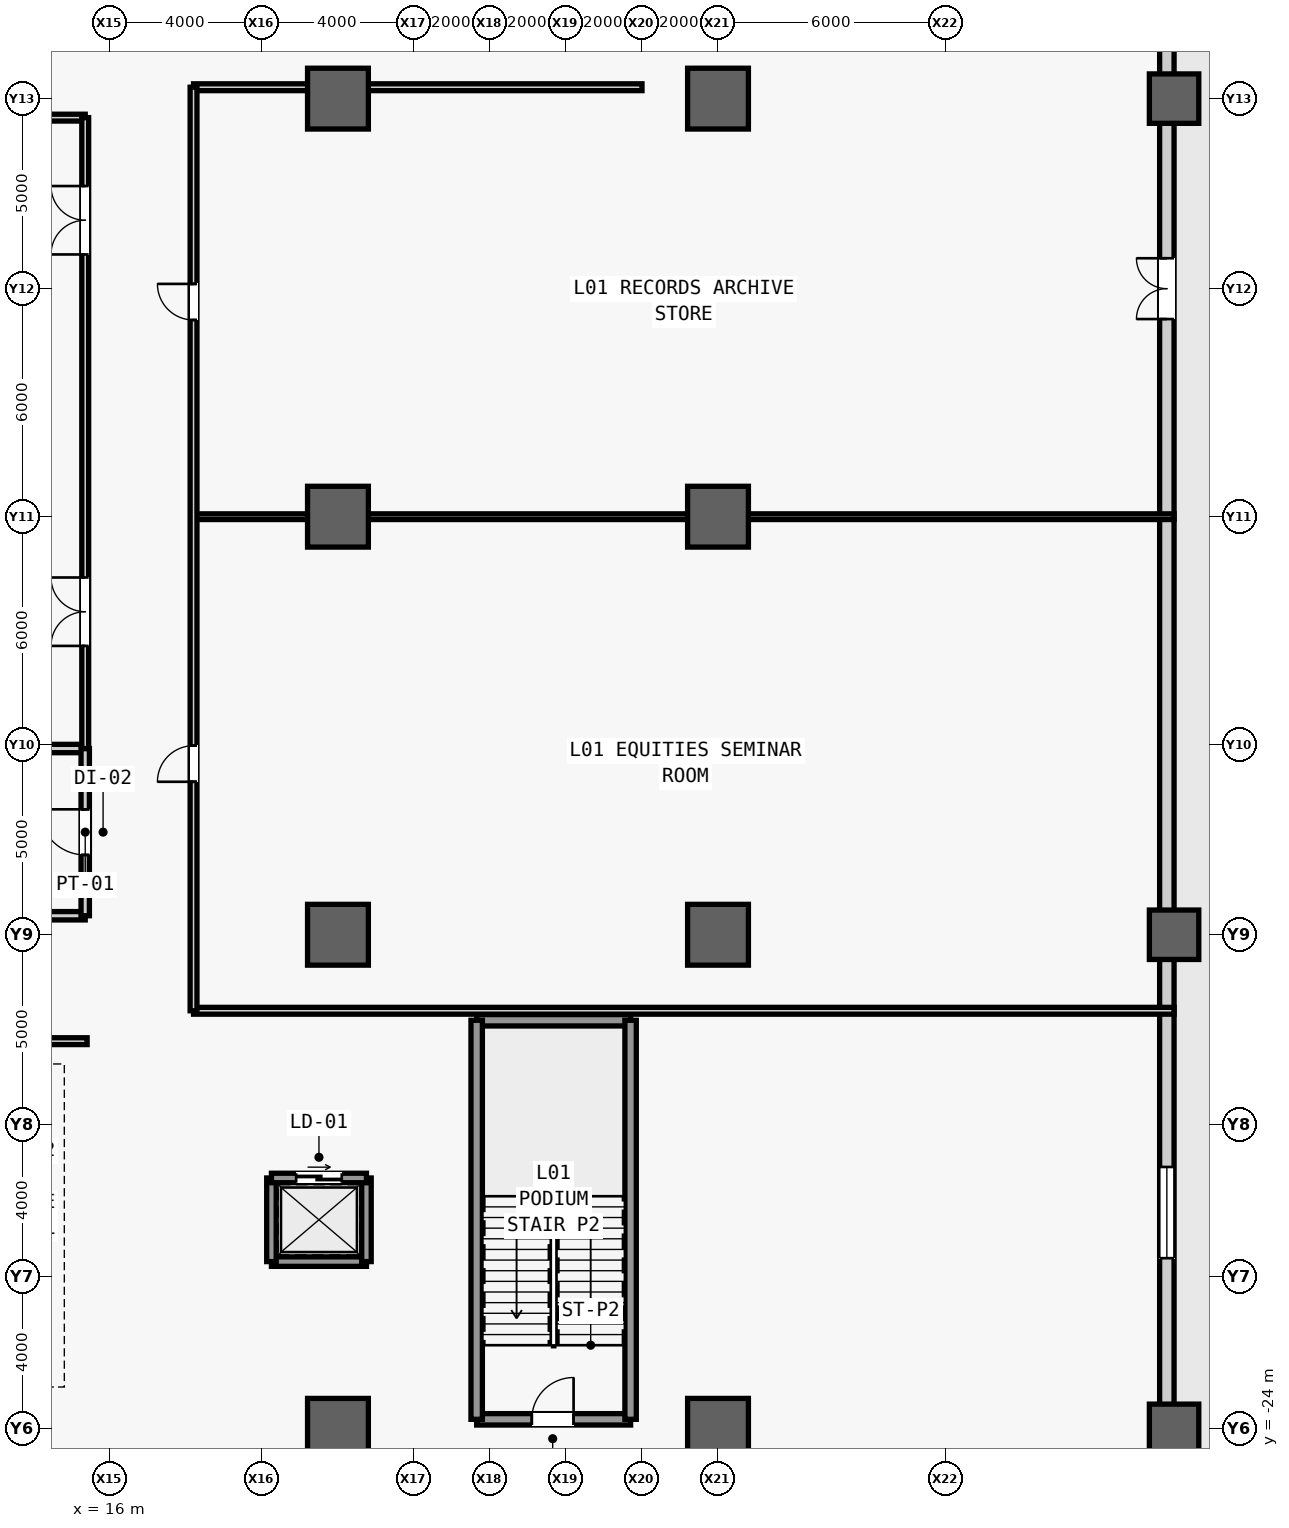
"""IFC4 building model, lengths in metres.
Left out: names, types, materials, properties, quantities, classifications, styles, units other than length and angle.
Written with IfcOpenShell. Run it as: python <this file> out.ifc"""

import sys

from ifc_helpers import new_model, si_unit, direction, frame, frame_2d, origin, origin_2d, place, context, subcontext, project, spatial, rectangle, extrude, source, transform, mapped, element, fill, save


model = new_model("IFC4")
c1 = context("Model", 3, precision=1e-05, world=origin(), true_north=direction((0.0, 1.0)))
c2 = subcontext(c1, "Body", "Model", "MODEL_VIEW")
j1 = project(units=[si_unit("LENGTHUNIT", "METRE"), si_unit("PLANEANGLEUNIT", "RADIAN")], contexts=[c1])
p1 = place(None, origin())
s1 = spatial("IfcSite", under=j1, at=p1, CompositionType="ELEMENT")
p2 = place(p1, origin())
s2 = spatial("IfcBuilding", under=s1, at=p2, CompositionType="ELEMENT")
p3 = place(p2, frame((0.0, 0.0, 6.6)))
s3 = spatial("IfcBuildingStorey", under=s2, at=p3, CompositionType="ELEMENT", Elevation=6.6)
m1 = source(origin(), c2, "Body", "SweptSolid", [
    extrude(rectangle(XDim=1.6, YDim=1.6, at=origin_2d()), origin(), (0.0, 0.0, 1.0), 5.4),
])
for number, where, z_axis, x_axis in (
    (1, (22.0, -24.0, 0.0), (0.0, 0.0, 1.0), (1.0, 0.0, 0.0)),
    (2, (22.0, -11.0, 0.0), (0.0, 0.0, 1.0), (1.0, 0.0, 0.0)),
    (3, (22.0, 0.0, 0.0), (0.0, 0.0, 1.0), (1.0, 0.0, 0.0)),
    (4, (22.0, 11.0, 0.0), (0.0, 0.0, 1.0), (1.0, 0.0, 0.0)),
    (5, (32.0, -24.0, 0.0), (0.0, 0.0, 1.0), (1.0, 0.0, 0.0)),
    (6, (32.0, -11.0, 0.0), (0.0, 0.0, 1.0), (1.0, 0.0, 0.0)),
    (7, (32.0, 0.0, 0.0), (0.0, 0.0, 1.0), (1.0, 0.0, 0.0)),
    (8, (32.0, 11.0, 0.0), (0.0, 0.0, 1.0), (1.0, 0.0, 0.0)),
):
    element("IfcColumn", number, at=place(p3, frame(where, z_axis=z_axis, x_axis=x_axis)), inside=s3, PredefinedType="COLUMN", context=c2, shape_type="MappedRepresentation", body=[
        mapped(m1, transform((0.0, 0.0, 0.0), scale=1.0)),
    ])
m2 = source(origin(), c2, "Body", "SweptSolid", [
    extrude(rectangle(XDim=1.3, YDim=1.3, at=origin_2d()), origin(), (0.0, 0.0, 1.0), 5.4),
])
for number, where, z_axis, x_axis in (
    (9, (44.0, -24.0, 0.0), (0.0, 0.0, 1.0), (1.0, 0.0, 0.0)),
    (10, (44.0, -11.0, 0.0), (0.0, 0.0, 1.0), (1.0, 0.0, 0.0)),
    (11, (44.0, 11.0, 0.0), (0.0, 0.0, 1.0), (1.0, 0.0, 0.0)),
):
    element("IfcColumn", number, at=place(p3, frame(where, z_axis=z_axis, x_axis=x_axis)), inside=s3, PredefinedType="COLUMN", context=c2, shape_type="MappedRepresentation", body=[
        mapped(m2, transform((0.0, 0.0, 0.0), scale=1.0)),
    ])
m3 = source(origin(), c2, "Body", "SweptSolid", [
    extrude(rectangle(XDim=73.24, YDim=0.38, at=frame_2d((36.62, 0.0))), origin(), (0.0, 0.0, 1.0), 3.28),
])
p4 = place(p3, frame((43.81, -36.62, 0.0), z_axis=(0.0, 0.0, 1.0), x_axis=(0.0, 1.0, 0.0)))
e12 = element("IfcWall", 12, at=p4, inside=s3, PredefinedType="STANDARD", context=c2, shape_type="MappedRepresentation", body=[
    mapped(m3, transform((0.0, 0.0, 0.0), scale=1.0)),
])
m4 = source(origin(), c2, "Body", "SweptSolid", [
    extrude(rectangle(XDim=1.6, YDim=2.25, at=frame_2d((0.8, 1.125))), frame((0.0, 0.2, 0.0), z_axis=(0.0, -1.0, 0.0), x_axis=(1.0, 0.0, 0.0)), (0.0, 0.0, 1.0), 0.4),
])
p5 = place(p4, frame((41.82, 0.0, 0.0)))
e13 = element("IfcOpeningElement", 13, at=p5, cuts=e12, PredefinedType="OPENING", context=c2, shape_type="MappedRepresentation", body=[
    mapped(m4, transform((0.0, 0.0, 0.0), scale=1.0)),
])
m5 = source(origin(), c2, "Body", "SweptSolid", [
    extrude(rectangle(XDim=2.4, YDim=2.56, at=frame_2d((1.2, 1.28))), frame((0.0, 0.2, 0.0), z_axis=(0.0, -1.0, 0.0), x_axis=(1.0, 0.0, 0.0)), (0.0, 0.0, 1.0), 0.4),
])
p6 = place(p4, frame((17.11, 0.0, 0.5)))
e14 = element("IfcOpeningElement", 14, at=p6, cuts=e12, PredefinedType="OPENING", context=c2, shape_type="MappedRepresentation", body=[
    mapped(m5, transform((0.0, 0.0, 0.0), scale=1.0)),
])
p7 = place(p4, frame((53.73, 0.0, 0.5)))
e15 = element("IfcOpeningElement", 15, at=p7, cuts=e12, PredefinedType="OPENING", context=c2, shape_type="MappedRepresentation", body=[
    mapped(m5, transform((0.0, 0.0, 0.0), scale=1.0)),
])
m6 = source(origin(), c2, "Body", "SweptSolid", [
    extrude(rectangle(XDim=4.05, YDim=0.22, at=frame_2d((2.025, 0.0))), origin(), (0.0, 0.0, 1.0), 5.08),
])
for number, where, z_axis, x_axis in (
    (16, (11.3, -10.5, 0.0), (0.0, 0.0, 1.0), (1.0, 0.0, 0.0)),
    (17, (11.3, -6.1, 0.0), (0.0, 0.0, 1.0), (1.0, 0.0, 0.0)),
):
    element("IfcWall", number, at=place(p3, frame(where, z_axis=z_axis, x_axis=x_axis)), inside=s3, PredefinedType="PARTITIONING", context=c2, shape_type="MappedRepresentation", body=[
        mapped(m6, transform((0.0, 0.0, 0.0), scale=1.0)),
    ])
m7 = source(origin(), c2, "Body", "SweptSolid", [
    extrude(rectangle(XDim=4.4, YDim=0.22, at=frame_2d((2.2, 0.0))), origin(), (0.0, 0.0, 1.0), 5.08),
])
p8 = place(p3, frame((15.35, -10.5, 0.0), z_axis=(0.0, 0.0, 1.0), x_axis=(0.0, 1.0, 0.0)))
e18 = element("IfcWall", 18, at=p8, inside=s3, PredefinedType="PARTITIONING", context=c2, shape_type="MappedRepresentation", body=[
    mapped(m7, transform((0.0, 0.0, 0.0), scale=1.0)),
])
m8 = source(origin(), c2, "Body", "SweptSolid", [
    extrude(rectangle(XDim=1.2, YDim=2.2, at=frame_2d((0.6, 1.1))), frame((0.0, 0.12, 0.0), z_axis=(0.0, -1.0, 0.0), x_axis=(1.0, 0.0, 0.0)), (0.0, 0.0, 1.0), 0.24),
])
p9 = place(p8, frame((1.6, 0.0, 0.0)))
e19 = element("IfcOpeningElement", 19, at=p9, cuts=e18, PredefinedType="OPENING", context=c2, shape_type="MappedRepresentation", body=[
    mapped(m8, transform((0.0, 0.0, 0.0), scale=1.0)),
])
m9 = source(origin(), c2, "Body", "SweptSolid", [
    extrude(rectangle(XDim=4.05, YDim=0.18, at=frame_2d((2.025, 0.0))), origin(), (0.0, 0.0, 1.0), 5.08),
])
p10 = place(p3, frame((11.3, 10.5, 0.0), z_axis=(0.0, 0.0, 1.0), x_axis=(1.0, 0.0, 0.0)))
e20 = element("IfcWall", 20, at=p10, inside=s3, PredefinedType="PARTITIONING", context=c2, shape_type="MappedRepresentation", body=[
    mapped(m9, transform((0.0, 0.0, 0.0), scale=1.0)),
])
m10 = source(origin(), c2, "Body", "SweptSolid", [
    extrude(rectangle(XDim=16.6, YDim=0.18, at=frame_2d((8.3, 0.0))), origin(), (0.0, 0.0, 1.0), 5.08),
])
p11 = place(p3, frame((15.35, -6.1, 0.0), z_axis=(0.0, 0.0, 1.0), x_axis=(0.0, 1.0, 0.0)))
e21 = element("IfcWall", 21, at=p11, inside=s3, PredefinedType="PARTITIONING", context=c2, shape_type="MappedRepresentation", body=[
    mapped(m10, transform((0.0, 0.0, 0.0), scale=1.0)),
])
m11 = source(origin(), c2, "Body", "SweptSolid", [
    extrude(rectangle(XDim=1.8, YDim=2.25, at=frame_2d((0.9, 1.125))), frame((0.0, 0.1, 0.0), z_axis=(0.0, -1.0, 0.0), x_axis=(1.0, 0.0, 0.0)), (0.0, 0.0, 1.0), 0.2),
])
p12 = place(p11, frame((2.7, 0.0, 0.0)))
e22 = element("IfcOpeningElement", 22, at=p12, cuts=e21, PredefinedType="OPENING", context=c2, shape_type="MappedRepresentation", body=[
    mapped(m11, transform((0.0, 0.0, 0.0), scale=1.0)),
])
p13 = place(p11, frame((13.0, 0.0, 0.0)))
e23 = element("IfcOpeningElement", 23, at=p13, cuts=e21, PredefinedType="OPENING", context=c2, shape_type="MappedRepresentation", body=[
    mapped(m11, transform((0.0, 0.0, 0.0), scale=1.0)),
])
m12 = source(origin(), c2, "Body", "SweptSolid", [
    extrude(rectangle(XDim=4.05, YDim=0.3, at=frame_2d((2.025, 0.0))), origin(), (0.0, 0.0, 1.0), 5.08),
])
p14 = place(p3, frame((25.65, -23.75, 0.0), z_axis=(0.0, 0.0, 1.0), x_axis=(1.0, 0.0, 0.0)))
e24 = element("IfcWall", 24, at=p14, inside=s3, PredefinedType="SHEAR", context=c2, shape_type="MappedRepresentation", body=[
    mapped(m12, transform((0.0, 0.0, 0.0), scale=1.0)),
])
m13 = source(origin(), c2, "Body", "SweptSolid", [
    extrude(rectangle(XDim=1.1, YDim=2.2, at=frame_2d((0.55, 1.1))), frame((0.0, 0.16, 0.0), z_axis=(0.0, -1.0, 0.0), x_axis=(1.0, 0.0, 0.0)), (0.0, 0.0, 1.0), 0.32),
])
p15 = place(p14, frame((1.45, 0.0, 0.0)))
e25 = element("IfcOpeningElement", 25, at=p15, cuts=e24, PredefinedType="OPENING", context=c2, shape_type="MappedRepresentation", body=[
    mapped(m13, transform((0.0, 0.0, 0.0), scale=1.0)),
])
p16 = place(p3, frame((25.65, -13.25, 0.0), z_axis=(0.0, 0.0, 1.0), x_axis=(1.0, 0.0, 0.0)))
e26 = element("IfcWall", 26, at=p16, inside=s3, PredefinedType="SHEAR", context=c2, shape_type="MappedRepresentation", body=[
    mapped(m12, transform((0.0, 0.0, 0.0), scale=1.0)),
])
m14 = source(origin(), c2, "Body", "SweptSolid", [
    extrude(rectangle(XDim=10.5, YDim=0.3, at=frame_2d((5.25, 0.0))), origin(), (0.0, 0.0, 1.0), 5.08),
])
for number, where, z_axis, x_axis in (
    (27, (25.65, -23.75, 0.0), (0.0, 0.0, 1.0), (0.0, 1.0, 0.0)),
    (28, (29.7, -23.75, 0.0), (0.0, 0.0, 1.0), (0.0, 1.0, 0.0)),
):
    element("IfcWall", number, at=place(p3, frame(where, z_axis=z_axis, x_axis=x_axis)), inside=s3, PredefinedType="SHEAR", context=c2, shape_type="MappedRepresentation", body=[
        mapped(m14, transform((0.0, 0.0, 0.0), scale=1.0)),
    ])
m15 = source(origin(), c2, "Body", "SweptSolid", [
    extrude(rectangle(XDim=2.5, YDim=0.25, at=frame_2d((1.25, 0.0))), origin(), (0.0, 0.0, 1.0), 5.08),
])
p17 = place(p3, frame((20.25, -19.6, 0.0), z_axis=(0.0, 0.0, 1.0), x_axis=(1.0, 0.0, 0.0)))
e29 = element("IfcWall", 29, at=p17, inside=s3, PredefinedType="SHEAR", context=c2, shape_type="MappedRepresentation", body=[
    mapped(m15, transform((0.0, 0.0, 0.0), scale=1.0)),
])
m16 = source(origin(), c2, "Body", "SweptSolid", [
    extrude(rectangle(XDim=2.2, YDim=0.25, at=frame_2d((1.1, 0.0))), origin(), (0.0, 0.0, 1.0), 5.08),
])
for number, where, z_axis, x_axis in (
    (30, (20.25, -19.6, 0.0), (0.0, 0.0, 1.0), (0.0, 1.0, 0.0)),
    (31, (22.75, -19.6, 0.0), (0.0, 0.0, 1.0), (0.0, 1.0, 0.0)),
):
    element("IfcWall", number, at=place(p3, frame(where, z_axis=z_axis, x_axis=x_axis)), inside=s3, PredefinedType="SHEAR", context=c2, shape_type="MappedRepresentation", body=[
        mapped(m16, transform((0.0, 0.0, 0.0), scale=1.0)),
    ])
p18 = place(p3, frame((20.25, -17.4, 0.0), z_axis=(0.0, 0.0, 1.0), x_axis=(1.0, 0.0, 0.0)))
e32 = element("IfcWall", 32, at=p18, inside=s3, PredefinedType="SHEAR", context=c2, shape_type="MappedRepresentation", body=[
    mapped(m15, transform((0.0, 0.0, 0.0), scale=1.0)),
])
m17 = source(origin(), c2, "Body", "SweptSolid", [
    extrude(rectangle(XDim=1.2, YDim=2.3, at=frame_2d((0.6, 1.15))), frame((0.0, 0.135, 0.0), z_axis=(0.0, -1.0, 0.0), x_axis=(1.0, 0.0, 0.0)), (0.0, 0.0, 1.0), 0.27),
])
p19 = place(p18, frame((0.65, 0.0, 0.0)))
e33 = element("IfcOpeningElement", 33, at=p19, cuts=e32, PredefinedType="OPENING", context=c2, shape_type="MappedRepresentation", body=[
    mapped(m17, transform((0.0, 0.0, 0.0), scale=1.0)),
])
m18 = source(origin(), c2, "Body", "SweptSolid", [
    extrude(rectangle(XDim=30.8, YDim=0.18, at=frame_2d((15.4, 0.0))), origin(), (0.0, 0.0, 1.0), 5.08),
])
p20 = place(p3, frame((-15.4, -13.8, 0.0), z_axis=(0.0, 0.0, 1.0), x_axis=(1.0, 0.0, 0.0)))
e34 = element("IfcWall", 34, at=p20, inside=s3, PredefinedType="PARTITIONING", context=c2, shape_type="MappedRepresentation", body=[
    mapped(m18, transform((0.0, 0.0, 0.0), scale=1.0)),
])
p21 = place(p20, frame((2.7, 0.0, 0.0)))
e35 = element("IfcOpeningElement", 35, at=p21, cuts=e34, PredefinedType="OPENING", context=c2, shape_type="MappedRepresentation", body=[
    mapped(m11, transform((0.0, 0.0, 0.0), scale=1.0)),
])
p22 = place(p20, frame((26.3, 0.0, 0.0)))
e36 = element("IfcOpeningElement", 36, at=p22, cuts=e34, PredefinedType="OPENING", context=c2, shape_type="MappedRepresentation", body=[
    mapped(m11, transform((0.0, 0.0, 0.0), scale=1.0)),
])
m19 = source(origin(), c2, "Body", "SweptSolid", [
    extrude(rectangle(XDim=11.8, YDim=0.18, at=frame_2d((5.9, 0.0))), origin(), (0.0, 0.0, 1.0), 3.28),
])
p23 = place(p3, frame((18.2, 11.3, 0.0), z_axis=(0.0, 0.0, 1.0), x_axis=(1.0, 0.0, 0.0)))
e37 = element("IfcWall", 37, at=p23, inside=s3, PredefinedType="PARTITIONING", context=c2, shape_type="MappedRepresentation", body=[
    mapped(m19, transform((0.0, 0.0, 0.0), scale=1.0)),
])
m20 = source(origin(), c2, "Body", "SweptSolid", [
    extrude(rectangle(XDim=25.8, YDim=0.18, at=frame_2d((12.9, 0.0))), origin(), (0.0, 0.0, 1.0), 5.08),
])
p24 = place(p3, frame((18.2, -13.0, 0.0), z_axis=(0.0, 0.0, 1.0), x_axis=(1.0, 0.0, 0.0)))
e38 = element("IfcWall", 38, at=p24, inside=s3, PredefinedType="PARTITIONING", context=c2, shape_type="MappedRepresentation", body=[
    mapped(m20, transform((0.0, 0.0, 0.0), scale=1.0)),
])
m21 = source(origin(), c2, "Body", "SweptSolid", [
    extrude(rectangle(XDim=25.8, YDim=0.15, at=frame_2d((12.9, 0.0))), origin(), (0.0, 0.0, 1.0), 3.28),
])
p25 = place(p3, frame((18.2, 0.0, 0.0), z_axis=(0.0, 0.0, 1.0), x_axis=(1.0, 0.0, 0.0)))
e39 = element("IfcWall", 39, at=p25, inside=s3, PredefinedType="PARTITIONING", context=c2, shape_type="MappedRepresentation", body=[
    mapped(m21, transform((0.0, 0.0, 0.0), scale=1.0)),
])
m22 = source(origin(), c2, "Body", "SweptSolid", [
    extrude(rectangle(XDim=24.3, YDim=0.18, at=frame_2d((12.15, 0.0))), origin(), (0.0, 0.0, 1.0), 5.08),
])
p26 = place(p3, frame((18.2, -13.0, 0.0), z_axis=(0.0, 0.0, 1.0), x_axis=(0.0, 1.0, 0.0)))
e40 = element("IfcWall", 40, at=p26, inside=s3, PredefinedType="PARTITIONING", context=c2, shape_type="MappedRepresentation", body=[
    mapped(m22, transform((0.0, 0.0, 0.0), scale=1.0)),
])
m23 = source(origin(), c2, "Body", "SweptSolid", [
    extrude(rectangle(XDim=0.95, YDim=2.15, at=frame_2d((0.475, 1.075))), frame((0.0, 0.1, 0.0), z_axis=(0.0, -1.0, 0.0), x_axis=(1.0, 0.0, 0.0)), (0.0, 0.0, 1.0), 0.2),
])
p27 = place(p26, frame((6.025, 0.0, 0.0)))
e41 = element("IfcOpeningElement", 41, at=p27, cuts=e40, PredefinedType="OPENING", context=c2, shape_type="MappedRepresentation", body=[
    mapped(m23, transform((0.0, 0.0, 0.0), scale=1.0)),
])
p28 = place(p26, frame((18.175, 0.0, 0.0)))
e42 = element("IfcOpeningElement", 42, at=p28, cuts=e40, PredefinedType="OPENING", context=c2, shape_type="MappedRepresentation", body=[
    mapped(m23, transform((0.0, 0.0, 0.0), scale=1.0)),
])
m24 = source(origin(), c2, "Body", "SweptSolid", [
    extrude(rectangle(XDim=1.6, YDim=2.25, at=frame_2d((0.8, 1.125))), frame((0.0, 0.025, 0.0), z_axis=(0.0, -1.0, 0.0), x_axis=(1.0, 0.0, 0.0)), (0.0, 0.0, 1.0), 0.05),
])
p29 = place(p5, origin())
e43 = element("IfcDoor", 43, at=p29, inside=s3, OperationType="DOUBLE_DOOR_SINGLE_SWING", PredefinedType="DOOR", context=c2, shape_type="MappedRepresentation", body=[
    mapped(m24, transform((0.0, 0.0, 0.0), scale=1.0)),
])
fill(e13, e43)
m25 = source(origin(), c2, "Body", "SweptSolid", [
    extrude(rectangle(XDim=2.4, YDim=2.56, at=frame_2d((1.2, 1.28))), frame((0.0, 0.03, 0.0), z_axis=(0.0, -1.0, 0.0), x_axis=(1.0, 0.0, 0.0)), (0.0, 0.0, 1.0), 0.06),
])
p30 = place(p6, origin())
e44 = element("IfcWindow", 44, at=p30, inside=s3, PartitioningType="SINGLE_PANEL", PredefinedType="WINDOW", context=c2, shape_type="MappedRepresentation", body=[
    mapped(m25, transform((0.0, 0.0, 0.0), scale=1.0)),
])
fill(e14, e44)
m26 = source(origin(), c2, "Body", "SweptSolid", [
    extrude(rectangle(XDim=1.2, YDim=2.2, at=frame_2d((0.6, 1.1))), frame((0.0, 0.025, 0.0), z_axis=(0.0, -1.0, 0.0), x_axis=(1.0, 0.0, 0.0)), (0.0, 0.0, 1.0), 0.05),
])
p31 = place(p9, origin())
e45 = element("IfcDoor", 45, at=p31, inside=s3, OperationType="SINGLE_SWING_RIGHT", PredefinedType="DOOR", context=c2, shape_type="MappedRepresentation", body=[
    mapped(m26, transform((0.0, 0.0, 0.0), scale=1.0)),
])
fill(e19, e45)
m27 = source(origin(), c2, "Body", "SweptSolid", [
    extrude(rectangle(XDim=1.8, YDim=2.25, at=frame_2d((0.9, 1.125))), frame((0.0, 0.025, 0.0), z_axis=(0.0, -1.0, 0.0), x_axis=(1.0, 0.0, 0.0)), (0.0, 0.0, 1.0), 0.05),
])
p32 = place(p12, origin())
e46 = element("IfcDoor", 46, at=p32, inside=s3, OperationType="SINGLE_SWING_RIGHT", PredefinedType="DOOR", context=c2, shape_type="MappedRepresentation", body=[
    mapped(m27, transform((0.0, 0.0, 0.0), scale=1.0)),
])
fill(e22, e46)
p33 = place(p13, origin())
e47 = element("IfcDoor", 47, at=p33, inside=s3, OperationType="SINGLE_SWING_LEFT", PredefinedType="DOOR", context=c2, shape_type="MappedRepresentation", body=[
    mapped(m27, transform((0.0, 0.0, 0.0), scale=1.0)),
])
fill(e23, e47)
m28 = source(origin(), c2, "Body", "SweptSolid", [
    extrude(rectangle(XDim=1.1, YDim=2.2, at=frame_2d((0.55, 1.1))), frame((0.0, 0.025, 0.0), z_axis=(0.0, -1.0, 0.0), x_axis=(1.0, 0.0, 0.0)), (0.0, 0.0, 1.0), 0.05),
])
p34 = place(p15, origin())
e48 = element("IfcDoor", 48, at=p34, inside=s3, OperationType="SINGLE_SWING_RIGHT", PredefinedType="DOOR", context=c2, shape_type="MappedRepresentation", body=[
    mapped(m28, transform((0.0, 0.0, 0.0), scale=1.0)),
])
fill(e25, e48)
m29 = source(origin(), c2, "Body", "SweptSolid", [
    extrude(rectangle(XDim=0.95, YDim=2.15, at=frame_2d((0.475, 1.075))), frame((0.0, 0.025, 0.0), z_axis=(0.0, -1.0, 0.0), x_axis=(1.0, 0.0, 0.0)), (0.0, 0.0, 1.0), 0.05),
])
p35 = place(p27, origin())
e49 = element("IfcDoor", 49, at=p35, inside=s3, OperationType="SINGLE_SWING_LEFT", PredefinedType="DOOR", context=c2, shape_type="MappedRepresentation", body=[
    mapped(m29, transform((0.0, 0.0, 0.0), scale=1.0)),
])
fill(e41, e49)
p36 = place(p28, origin())
e50 = element("IfcDoor", 50, at=p36, inside=s3, OperationType="SINGLE_SWING_RIGHT", PredefinedType="DOOR", context=c2, shape_type="MappedRepresentation", body=[
    mapped(m29, transform((0.0, 0.0, 0.0), scale=1.0)),
])
fill(e42, e50)
m30 = source(origin(), c2, "Body", "SweptSolid", [
    extrude(rectangle(XDim=1.2, YDim=2.3, at=frame_2d((0.6, 1.15))), frame((0.0, 0.025, 0.0), z_axis=(0.0, -1.0, 0.0), x_axis=(1.0, 0.0, 0.0)), (0.0, 0.0, 1.0), 0.05),
])
p37 = place(p19, origin())
e51 = element("IfcDoor", 51, at=p37, inside=s3, OperationType="SLIDING_TO_LEFT", PredefinedType="DOOR", context=c2, shape_type="MappedRepresentation", body=[
    mapped(m30, transform((0.0, 0.0, 0.0), scale=1.0)),
])
fill(e33, e51)
save(model, sys.argv[1])
